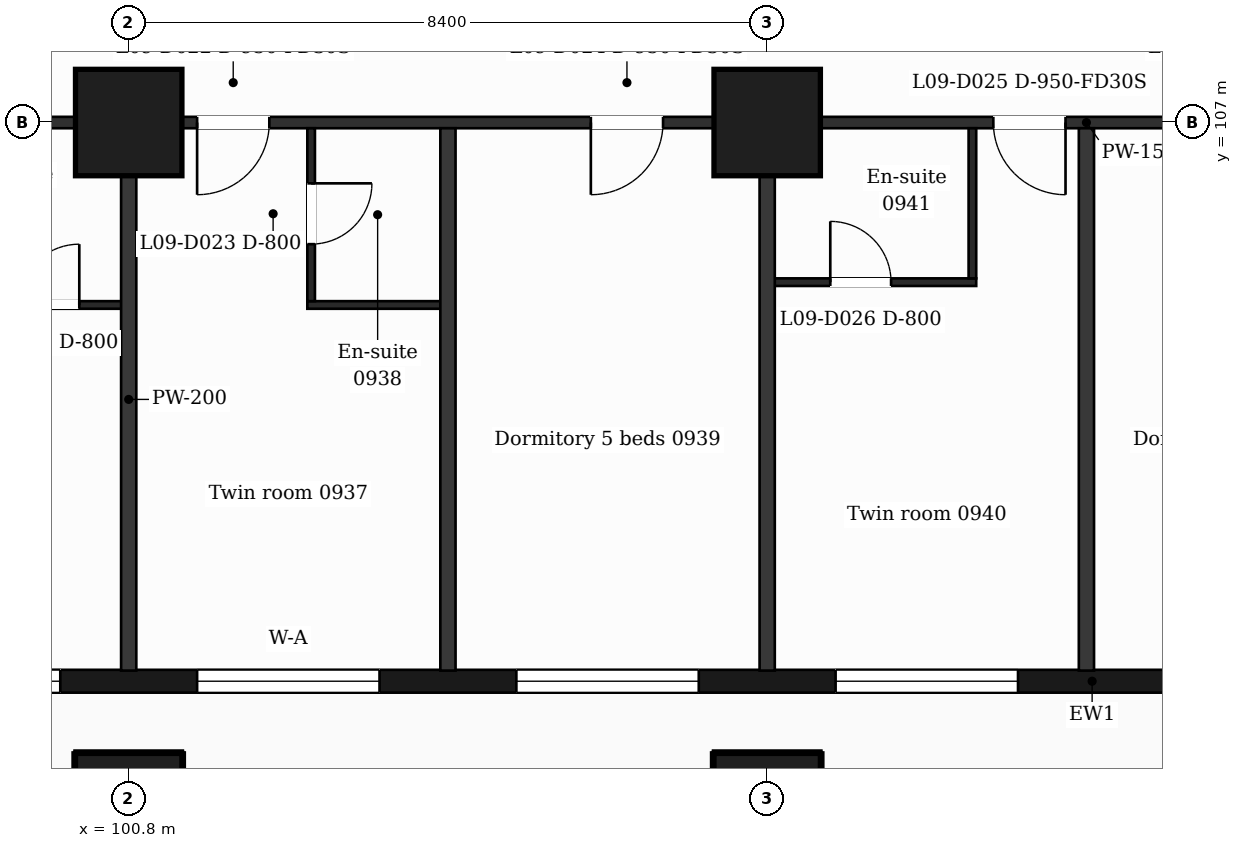
"""IFC4 building model, lengths in metres.
Left out: names, types, materials, properties, quantities, classifications, styles, units other than length and angle.
Written with IfcOpenShell. Run it as: python <this file> out.ifc"""

import sys

from ifc_helpers import new_model, si_unit, direction, frame, frame_2d, origin, origin_2d, place, context, subcontext, project, spatial, rectangle, extrude, element, fill, save


model = new_model("IFC4")
c1 = context("Model", 3, precision=1e-05, world=origin(), true_north=direction((0.0, 1.0)))
c2 = subcontext(c1, "Body", "Model", "MODEL_VIEW")
j1 = project(units=[si_unit("LENGTHUNIT", "METRE"), si_unit("PLANEANGLEUNIT", "RADIAN")], contexts=[c1])
p1 = place(None, origin())
s1 = spatial("IfcSite", under=j1, at=p1, CompositionType="ELEMENT")
p2 = place(p1, origin())
s2 = spatial("IfcBuilding", under=s1, at=p2, CompositionType="ELEMENT")
p3 = place(p2, frame((0.0, 0.0, 49.5)))
s3 = spatial("IfcBuildingStorey", under=s2, at=p3, CompositionType="ELEMENT", Elevation=49.5)
for number, where, z_axis, x_axis in (
    (1, (100.8, 98.0, 0.0), (0.0, 0.0, 1.0), (1.0, 0.0, 0.0)),
    (2, (109.2, 98.0, 0.0), (0.0, 0.0, 1.0), (1.0, 0.0, 0.0)),
    (3, (100.8, 107.0, 0.0), (0.0, 0.0, 1.0), (1.0, 0.0, 0.0)),
    (4, (109.2, 107.0, 0.0), (0.0, 0.0, 1.0), (1.0, 0.0, 0.0)),
):
    element("IfcColumn", number, at=place(p3, frame(where, z_axis=z_axis, x_axis=x_axis)), inside=s3, PredefinedType="COLUMN", context=c2, shape_type="SweptSolid", body=[
        extrude(rectangle(XDim=1.4, YDim=1.4, at=origin_2d()), origin(), (0.0, 0.0, 1.0), 3.5),
    ])
p4 = place(p3, frame((89.85, 99.65, 0.0), z_axis=(0.0, 0.0, 1.0), x_axis=(1.0, 0.0, 0.0)))
e5 = element("IfcWall", 5, at=p4, inside=s3, PredefinedType="SOLIDWALL", context=c2, shape_type="SweptSolid", body=[
    extrude(rectangle(XDim=47.25, YDim=0.3, at=frame_2d((23.625, 0.0))), origin(), (0.0, 0.0, 1.0), 3.18),
])
p5 = place(p4, frame((0.725, 0.0, 0.9)))
e6 = element("IfcOpeningElement", 6, at=p5, cuts=e5, PredefinedType="OPENING", context=c2, shape_type="SweptSolid", body=[
    extrude(rectangle(XDim=1.2, YDim=2.1, at=frame_2d((0.6, 1.05))), frame((0.0, 0.16, 0.0), z_axis=(0.0, -1.0, 0.0), x_axis=(1.0, 0.0, 0.0)), (0.0, 0.0, 1.0), 0.32),
])
p6 = place(p4, frame((3.45, 0.0, 0.9)))
e7 = element("IfcOpeningElement", 7, at=p6, cuts=e5, PredefinedType="OPENING", context=c2, shape_type="SweptSolid", body=[
    extrude(rectangle(XDim=2.4, YDim=2.1, at=frame_2d((1.2, 1.05))), frame((0.0, 0.16, 0.0), z_axis=(0.0, -1.0, 0.0), x_axis=(1.0, 0.0, 0.0)), (0.0, 0.0, 1.0), 0.32),
])
p7 = place(p4, frame((7.65, 0.0, 0.9)))
e8 = element("IfcOpeningElement", 8, at=p7, cuts=e5, PredefinedType="OPENING", context=c2, shape_type="SweptSolid", body=[
    extrude(rectangle(XDim=2.4, YDim=2.1, at=frame_2d((1.2, 1.05))), frame((0.0, 0.16, 0.0), z_axis=(0.0, -1.0, 0.0), x_axis=(1.0, 0.0, 0.0)), (0.0, 0.0, 1.0), 0.32),
])
p8 = place(p4, frame((11.85, 0.0, 0.9)))
e9 = element("IfcOpeningElement", 9, at=p8, cuts=e5, PredefinedType="OPENING", context=c2, shape_type="SweptSolid", body=[
    extrude(rectangle(XDim=2.4, YDim=2.1, at=frame_2d((1.2, 1.05))), frame((0.0, 0.16, 0.0), z_axis=(0.0, -1.0, 0.0), x_axis=(1.0, 0.0, 0.0)), (0.0, 0.0, 1.0), 0.32),
])
p9 = place(p4, frame((16.05, 0.0, 0.9)))
e10 = element("IfcOpeningElement", 10, at=p9, cuts=e5, PredefinedType="OPENING", context=c2, shape_type="SweptSolid", body=[
    extrude(rectangle(XDim=2.4, YDim=2.1, at=frame_2d((1.2, 1.05))), frame((0.0, 0.16, 0.0), z_axis=(0.0, -1.0, 0.0), x_axis=(1.0, 0.0, 0.0)), (0.0, 0.0, 1.0), 0.32),
])
p10 = place(p4, frame((20.25, 0.0, 0.9)))
e11 = element("IfcOpeningElement", 11, at=p10, cuts=e5, PredefinedType="OPENING", context=c2, shape_type="SweptSolid", body=[
    extrude(rectangle(XDim=2.4, YDim=2.1, at=frame_2d((1.2, 1.05))), frame((0.0, 0.16, 0.0), z_axis=(0.0, -1.0, 0.0), x_axis=(1.0, 0.0, 0.0)), (0.0, 0.0, 1.0), 0.32),
])
p11 = place(p4, frame((25.05, 0.0, 0.9)))
e12 = element("IfcOpeningElement", 12, at=p11, cuts=e5, PredefinedType="OPENING", context=c2, shape_type="SweptSolid", body=[
    extrude(rectangle(XDim=1.2, YDim=2.1, at=frame_2d((0.6, 1.05))), frame((0.0, 0.16, 0.0), z_axis=(0.0, -1.0, 0.0), x_axis=(1.0, 0.0, 0.0)), (0.0, 0.0, 1.0), 0.32),
])
p12 = place(p4, frame((29.25, 0.0, 0.9)))
e13 = element("IfcOpeningElement", 13, at=p12, cuts=e5, PredefinedType="OPENING", context=c2, shape_type="SweptSolid", body=[
    extrude(rectangle(XDim=1.2, YDim=2.1, at=frame_2d((0.6, 1.05))), frame((0.0, 0.16, 0.0), z_axis=(0.0, -1.0, 0.0), x_axis=(1.0, 0.0, 0.0)), (0.0, 0.0, 1.0), 0.32),
])
p13 = place(p4, frame((32.55, 0.0, 0.0)))
e14 = element("IfcOpeningElement", 14, at=p13, cuts=e5, PredefinedType="OPENING", context=c2, shape_type="SweptSolid", body=[
    extrude(rectangle(XDim=1.2, YDim=2.4, at=frame_2d((0.6, 1.2))), frame((0.0, 0.16, 0.0), z_axis=(0.0, -1.0, 0.0), x_axis=(1.0, 0.0, 0.0)), (0.0, 0.0, 1.0), 0.32),
])
p14 = place(p4, frame((34.35, 0.0, 0.9)))
e15 = element("IfcOpeningElement", 15, at=p14, cuts=e5, PredefinedType="OPENING", context=c2, shape_type="SweptSolid", body=[
    extrude(rectangle(XDim=1.2, YDim=2.1, at=frame_2d((0.6, 1.05))), frame((0.0, 0.16, 0.0), z_axis=(0.0, -1.0, 0.0), x_axis=(1.0, 0.0, 0.0)), (0.0, 0.0, 1.0), 0.32),
])
p15 = place(p4, frame((37.05, 0.0, 0.9)))
e16 = element("IfcOpeningElement", 16, at=p15, cuts=e5, PredefinedType="OPENING", context=c2, shape_type="SweptSolid", body=[
    extrude(rectangle(XDim=2.4, YDim=2.1, at=frame_2d((1.2, 1.05))), frame((0.0, 0.16, 0.0), z_axis=(0.0, -1.0, 0.0), x_axis=(1.0, 0.0, 0.0)), (0.0, 0.0, 1.0), 0.32),
])
p16 = place(p4, frame((40.95, 0.0, 0.0)))
e17 = element("IfcOpeningElement", 17, at=p16, cuts=e5, PredefinedType="OPENING", context=c2, shape_type="SweptSolid", body=[
    extrude(rectangle(XDim=1.2, YDim=2.4, at=frame_2d((0.6, 1.2))), frame((0.0, 0.16, 0.0), z_axis=(0.0, -1.0, 0.0), x_axis=(1.0, 0.0, 0.0)), (0.0, 0.0, 1.0), 0.32),
])
p17 = place(p4, frame((42.75, 0.0, 0.9)))
e18 = element("IfcOpeningElement", 18, at=p17, cuts=e5, PredefinedType="OPENING", context=c2, shape_type="SweptSolid", body=[
    extrude(rectangle(XDim=1.2, YDim=2.1, at=frame_2d((0.6, 1.05))), frame((0.0, 0.16, 0.0), z_axis=(0.0, -1.0, 0.0), x_axis=(1.0, 0.0, 0.0)), (0.0, 0.0, 1.0), 0.32),
])
p18 = place(p4, frame((45.25, 0.0, 0.9)))
e19 = element("IfcOpeningElement", 19, at=p18, cuts=e5, PredefinedType="OPENING", context=c2, shape_type="SweptSolid", body=[
    extrude(rectangle(XDim=1.2, YDim=2.1, at=frame_2d((0.6, 1.05))), frame((0.0, 0.16, 0.0), z_axis=(0.0, -1.0, 0.0), x_axis=(1.0, 0.0, 0.0)), (0.0, 0.0, 1.0), 0.32),
])
p19 = place(p3, frame((98.05, 104.6, 0.0), z_axis=(0.0, 0.0, 1.0), x_axis=(1.0, 0.0, 0.0)))
e20 = element("IfcWall", 20, at=p19, inside=s3, PredefinedType="PARTITIONING", context=c2, shape_type="SweptSolid", body=[
    extrude(rectangle(XDim=2.75, YDim=0.1, at=frame_2d((1.375, 0.0))), origin(), (0.0, 0.0, 1.0), 3.18),
])
p20 = place(p19, frame((1.3, 0.0, 0.0)))
e21 = element("IfcOpeningElement", 21, at=p20, cuts=e20, PredefinedType="OPENING", context=c2, shape_type="SweptSolid", body=[
    extrude(rectangle(XDim=0.8, YDim=2.1, at=frame_2d((0.4, 1.05))), frame((0.0, 0.06, 0.0), z_axis=(0.0, -1.0, 0.0), x_axis=(1.0, 0.0, 0.0)), (0.0, 0.0, 1.0), 0.12),
])
p21 = place(p3, frame((103.15, 104.6, 0.0), z_axis=(0.0, 0.0, 1.0), x_axis=(1.0, 0.0, 0.0)))
e22 = element("IfcWall", 22, at=p21, inside=s3, PredefinedType="PARTITIONING", context=c2, shape_type="SweptSolid", body=[
    extrude(rectangle(XDim=1.85, YDim=0.1, at=frame_2d((0.925, 0.0))), origin(), (0.0, 0.0, 1.0), 3.18),
])
p22 = place(p3, frame((109.2, 104.9, 0.0), z_axis=(0.0, 0.0, 1.0), x_axis=(1.0, 0.0, 0.0)))
e23 = element("IfcWall", 23, at=p22, inside=s3, PredefinedType="PARTITIONING", context=c2, shape_type="SweptSolid", body=[
    extrude(rectangle(XDim=2.75, YDim=0.1, at=frame_2d((1.375, 0.0))), origin(), (0.0, 0.0, 1.0), 3.18),
])
p23 = place(p22, frame((0.83, 0.0, 0.0)))
e24 = element("IfcOpeningElement", 24, at=p23, cuts=e23, PredefinedType="OPENING", context=c2, shape_type="SweptSolid", body=[
    extrude(rectangle(XDim=0.8, YDim=2.1, at=frame_2d((0.4, 1.05))), frame((0.0, 0.06, 0.0), z_axis=(0.0, -1.0, 0.0), x_axis=(1.0, 0.0, 0.0)), (0.0, 0.0, 1.0), 0.12),
])
p24 = place(p3, frame((87.018, 107.0, 0.0), z_axis=(0.0, 0.0, 1.0), x_axis=(1.0, 0.0, 0.0)))
e25 = element("IfcWall", 25, at=p24, inside=s3, PredefinedType="PARTITIONING", context=c2, shape_type="SweptSolid", body=[
    extrude(rectangle(XDim=52.765, YDim=0.15, at=frame_2d((26.382, 0.0))), origin(), (0.0, 0.0, 1.0), 3.18),
])
p25 = place(p24, frame((0.87, 0.0, 0.0)))
e26 = element("IfcOpeningElement", 26, at=p25, cuts=e25, PredefinedType="OPENING", context=c2, shape_type="SweptSolid", body=[
    extrude(rectangle(XDim=0.95, YDim=2.1, at=frame_2d((0.475, 1.05))), frame((0.0, 0.085, 0.0), z_axis=(0.0, -1.0, 0.0), x_axis=(1.0, 0.0, 0.0)), (0.0, 0.0, 1.0), 0.17),
])
p26 = place(p24, frame((6.752, 0.0, 0.0)))
e27 = element("IfcOpeningElement", 27, at=p26, cuts=e25, PredefinedType="OPENING", context=c2, shape_type="SweptSolid", body=[
    extrude(rectangle(XDim=0.95, YDim=2.1, at=frame_2d((0.475, 1.05))), frame((0.0, 0.085, 0.0), z_axis=(0.0, -1.0, 0.0), x_axis=(1.0, 0.0, 0.0)), (0.0, 0.0, 1.0), 0.17),
])
p27 = place(p24, frame((9.857, 0.0, 0.0)))
e28 = element("IfcOpeningElement", 28, at=p27, cuts=e25, PredefinedType="OPENING", context=c2, shape_type="SweptSolid", body=[
    extrude(rectangle(XDim=0.95, YDim=2.1, at=frame_2d((0.475, 1.05))), frame((0.0, 0.085, 0.0), z_axis=(0.0, -1.0, 0.0), x_axis=(1.0, 0.0, 0.0)), (0.0, 0.0, 1.0), 0.17),
])
p28 = place(p24, frame((14.682, 0.0, 0.0)))
e29 = element("IfcOpeningElement", 29, at=p28, cuts=e25, PredefinedType="OPENING", context=c2, shape_type="SweptSolid", body=[
    extrude(rectangle(XDim=0.95, YDim=2.1, at=frame_2d((0.475, 1.05))), frame((0.0, 0.085, 0.0), z_axis=(0.0, -1.0, 0.0), x_axis=(1.0, 0.0, 0.0)), (0.0, 0.0, 1.0), 0.17),
])
p29 = place(p24, frame((19.862, 0.0, 0.0)))
e30 = element("IfcOpeningElement", 30, at=p29, cuts=e25, PredefinedType="OPENING", context=c2, shape_type="SweptSolid", body=[
    extrude(rectangle(XDim=0.95, YDim=2.1, at=frame_2d((0.475, 1.05))), frame((0.0, 0.085, 0.0), z_axis=(0.0, -1.0, 0.0), x_axis=(1.0, 0.0, 0.0)), (0.0, 0.0, 1.0), 0.17),
])
p30 = place(p24, frame((25.157, 0.0, 0.0)))
e31 = element("IfcOpeningElement", 31, at=p30, cuts=e25, PredefinedType="OPENING", context=c2, shape_type="SweptSolid", body=[
    extrude(rectangle(XDim=0.95, YDim=2.1, at=frame_2d((0.475, 1.05))), frame((0.0, 0.085, 0.0), z_axis=(0.0, -1.0, 0.0), x_axis=(1.0, 0.0, 0.0)), (0.0, 0.0, 1.0), 0.17),
])
p31 = place(p24, frame((28.262, 0.0, 0.0)))
e32 = element("IfcOpeningElement", 32, at=p31, cuts=e25, PredefinedType="OPENING", context=c2, shape_type="SweptSolid", body=[
    extrude(rectangle(XDim=0.95, YDim=2.1, at=frame_2d((0.475, 1.05))), frame((0.0, 0.085, 0.0), z_axis=(0.0, -1.0, 0.0), x_axis=(1.0, 0.0, 0.0)), (0.0, 0.0, 1.0), 0.17),
])
p32 = place(p24, frame((32.207, 0.0, 0.0)))
e33 = element("IfcOpeningElement", 33, at=p32, cuts=e25, PredefinedType="OPENING", context=c2, shape_type="SweptSolid", body=[
    extrude(rectangle(XDim=0.95, YDim=2.1, at=frame_2d((0.475, 1.05))), frame((0.0, 0.085, 0.0), z_axis=(0.0, -1.0, 0.0), x_axis=(1.0, 0.0, 0.0)), (0.0, 0.0, 1.0), 0.17),
])
p33 = place(p24, frame((37.094, 0.0, 0.0)))
e34 = element("IfcOpeningElement", 34, at=p33, cuts=e25, PredefinedType="OPENING", context=c2, shape_type="SweptSolid", body=[
    extrude(rectangle(XDim=0.95, YDim=2.1, at=frame_2d((0.475, 1.05))), frame((0.0, 0.085, 0.0), z_axis=(0.0, -1.0, 0.0), x_axis=(1.0, 0.0, 0.0)), (0.0, 0.0, 1.0), 0.17),
])
p34 = place(p24, frame((43.045, 0.0, 0.0)))
e35 = element("IfcOpeningElement", 35, at=p34, cuts=e25, PredefinedType="OPENING", context=c2, shape_type="SweptSolid", body=[
    extrude(rectangle(XDim=0.95, YDim=2.1, at=frame_2d((0.475, 1.05))), frame((0.0, 0.085, 0.0), z_axis=(0.0, -1.0, 0.0), x_axis=(1.0, 0.0, 0.0)), (0.0, 0.0, 1.0), 0.17),
])
p35 = place(p24, frame((49.285, 0.0, 0.0)))
e36 = element("IfcOpeningElement", 36, at=p35, cuts=e25, PredefinedType="OPENING", context=c2, shape_type="SweptSolid", body=[
    extrude(rectangle(XDim=0.95, YDim=2.1, at=frame_2d((0.475, 1.05))), frame((0.0, 0.085, 0.0), z_axis=(0.0, -1.0, 0.0), x_axis=(1.0, 0.0, 0.0)), (0.0, 0.0, 1.0), 0.17),
])
p36 = place(p3, frame((100.8, 99.79, 0.0), z_axis=(0.0, 0.0, 1.0), x_axis=(0.0, 1.0, 0.0)))
e37 = element("IfcWall", 37, at=p36, inside=s3, PredefinedType="PARTITIONING", context=c2, shape_type="SweptSolid", body=[
    extrude(rectangle(XDim=7.135, YDim=0.2, at=frame_2d((3.567, 0.0))), origin(), (0.0, 0.0, 1.0), 3.18),
])
p37 = place(p3, frame((103.2, 104.65, 0.0), z_axis=(0.0, 0.0, 1.0), x_axis=(0.0, 1.0, 0.0)))
e38 = element("IfcWall", 38, at=p37, inside=s3, PredefinedType="PARTITIONING", context=c2, shape_type="SweptSolid", body=[
    extrude(rectangle(XDim=2.275, YDim=0.1, at=frame_2d((1.138, 0.0))), origin(), (0.0, 0.0, 1.0), 3.18),
])
p38 = place(p37, frame((0.75, 0.0, 0.0)))
e39 = element("IfcOpeningElement", 39, at=p38, cuts=e38, PredefinedType="OPENING", context=c2, shape_type="SweptSolid", body=[
    extrude(rectangle(XDim=0.8, YDim=2.1, at=frame_2d((0.4, 1.05))), frame((0.0, 0.06, 0.0), z_axis=(0.0, -1.0, 0.0), x_axis=(1.0, 0.0, 0.0)), (0.0, 0.0, 1.0), 0.12),
])
for number, where, z_axis, x_axis in (
    (40, (105.0, 99.79, 0.0), (0.0, 0.0, 1.0), (0.0, 1.0, 0.0)),
    (41, (109.2, 99.79, 0.0), (0.0, 0.0, 1.0), (0.0, 1.0, 0.0)),
):
    element("IfcWall", number, at=place(p3, frame(where, z_axis=z_axis, x_axis=x_axis)), inside=s3, PredefinedType="PARTITIONING", context=c2, shape_type="SweptSolid", body=[
        extrude(rectangle(XDim=7.135, YDim=0.2, at=frame_2d((3.567, 0.0))), origin(), (0.0, 0.0, 1.0), 3.18),
    ])
p39 = place(p3, frame((111.9, 104.95, 0.0), z_axis=(0.0, 0.0, 1.0), x_axis=(0.0, 1.0, 0.0)))
e42 = element("IfcWall", 42, at=p39, inside=s3, PredefinedType="PARTITIONING", context=c2, shape_type="SweptSolid", body=[
    extrude(rectangle(XDim=1.975, YDim=0.1, at=frame_2d((0.988, 0.0))), origin(), (0.0, 0.0, 1.0), 3.18),
])
p40 = place(p3, frame((113.4, 99.79, 0.0), z_axis=(0.0, 0.0, 1.0), x_axis=(0.0, 1.0, 0.0)))
e43 = element("IfcWall", 43, at=p40, inside=s3, PredefinedType="PARTITIONING", context=c2, shape_type="SweptSolid", body=[
    extrude(rectangle(XDim=7.135, YDim=0.2, at=frame_2d((3.567, 0.0))), origin(), (0.0, 0.0, 1.0), 3.18),
])
p41 = place(p7, origin())
e44 = element("IfcWindow", 44, at=p41, inside=s3, PartitioningType="SINGLE_PANEL", PredefinedType="WINDOW", context=c2, shape_type="SweptSolid", body=[
    extrude(rectangle(XDim=2.4, YDim=2.1, at=frame_2d((1.2, 1.05))), frame((0.0, 0.03, 0.0), z_axis=(0.0, -1.0, 0.0), x_axis=(1.0, 0.0, 0.0)), (0.0, 0.0, 1.0), 0.06),
])
fill(e8, e44)
p42 = place(p8, origin())
e45 = element("IfcWindow", 45, at=p42, inside=s3, PartitioningType="SINGLE_PANEL", PredefinedType="WINDOW", context=c2, shape_type="SweptSolid", body=[
    extrude(rectangle(XDim=2.4, YDim=2.1, at=frame_2d((1.2, 1.05))), frame((0.0, 0.03, 0.0), z_axis=(0.0, -1.0, 0.0), x_axis=(1.0, 0.0, 0.0)), (0.0, 0.0, 1.0), 0.06),
])
fill(e9, e45)
p43 = place(p9, origin())
e46 = element("IfcWindow", 46, at=p43, inside=s3, PartitioningType="SINGLE_PANEL", PredefinedType="WINDOW", context=c2, shape_type="SweptSolid", body=[
    extrude(rectangle(XDim=2.4, YDim=2.1, at=frame_2d((1.2, 1.05))), frame((0.0, 0.03, 0.0), z_axis=(0.0, -1.0, 0.0), x_axis=(1.0, 0.0, 0.0)), (0.0, 0.0, 1.0), 0.06),
])
fill(e10, e46)
p44 = place(p10, origin())
e47 = element("IfcWindow", 47, at=p44, inside=s3, PartitioningType="SINGLE_PANEL", PredefinedType="WINDOW", context=c2, shape_type="SweptSolid", body=[
    extrude(rectangle(XDim=2.4, YDim=2.1, at=frame_2d((1.2, 1.05))), frame((0.0, 0.03, 0.0), z_axis=(0.0, -1.0, 0.0), x_axis=(1.0, 0.0, 0.0)), (0.0, 0.0, 1.0), 0.06),
])
fill(e11, e47)
p45 = place(p20, origin())
e48 = element("IfcDoor", 48, at=p45, inside=s3, OperationType="SINGLE_SWING_RIGHT", PredefinedType="DOOR", context=c2, shape_type="SweptSolid", body=[
    extrude(rectangle(XDim=0.8, YDim=2.1, at=frame_2d((0.4, 1.05))), frame((0.0, 0.025, 0.0), z_axis=(0.0, -1.0, 0.0), x_axis=(1.0, 0.0, 0.0)), (0.0, 0.0, 1.0), 0.05),
])
fill(e21, e48)
p46 = place(p28, origin())
e49 = element("IfcDoor", 49, at=p46, inside=s3, OperationType="SINGLE_SWING_LEFT", PredefinedType="DOOR", context=c2, shape_type="SweptSolid", body=[
    extrude(rectangle(XDim=0.95, YDim=2.1, at=frame_2d((0.475, 1.05))), frame((0.0, 0.025, 0.0), z_axis=(0.0, -1.0, 0.0), x_axis=(1.0, 0.0, 0.0)), (0.0, 0.0, 1.0), 0.05),
])
fill(e29, e49)
p47 = place(p38, origin())
e50 = element("IfcDoor", 50, at=p47, inside=s3, OperationType="SINGLE_SWING_RIGHT", PredefinedType="DOOR", context=c2, shape_type="SweptSolid", body=[
    extrude(rectangle(XDim=0.8, YDim=2.1, at=frame_2d((0.4, 1.05))), frame((0.0, 0.025, 0.0), z_axis=(0.0, -1.0, 0.0), x_axis=(1.0, 0.0, 0.0)), (0.0, 0.0, 1.0), 0.05),
])
fill(e39, e50)
p48 = place(p29, origin())
e51 = element("IfcDoor", 51, at=p48, inside=s3, OperationType="SINGLE_SWING_LEFT", PredefinedType="DOOR", context=c2, shape_type="SweptSolid", body=[
    extrude(rectangle(XDim=0.95, YDim=2.1, at=frame_2d((0.475, 1.05))), frame((0.0, 0.025, 0.0), z_axis=(0.0, -1.0, 0.0), x_axis=(1.0, 0.0, 0.0)), (0.0, 0.0, 1.0), 0.05),
])
fill(e30, e51)
p49 = place(p30, origin())
e52 = element("IfcDoor", 52, at=p49, inside=s3, OperationType="SINGLE_SWING_RIGHT", PredefinedType="DOOR", context=c2, shape_type="SweptSolid", body=[
    extrude(rectangle(XDim=0.95, YDim=2.1, at=frame_2d((0.475, 1.05))), frame((0.0, 0.025, 0.0), z_axis=(0.0, -1.0, 0.0), x_axis=(1.0, 0.0, 0.0)), (0.0, 0.0, 1.0), 0.05),
])
fill(e31, e52)
p50 = place(p23, origin())
e53 = element("IfcDoor", 53, at=p50, inside=s3, OperationType="SINGLE_SWING_LEFT", PredefinedType="DOOR", context=c2, shape_type="SweptSolid", body=[
    extrude(rectangle(XDim=0.8, YDim=2.1, at=frame_2d((0.4, 1.05))), frame((0.0, 0.025, 0.0), z_axis=(0.0, -1.0, 0.0), x_axis=(1.0, 0.0, 0.0)), (0.0, 0.0, 1.0), 0.05),
])
fill(e24, e53)
save(model, sys.argv[1])
